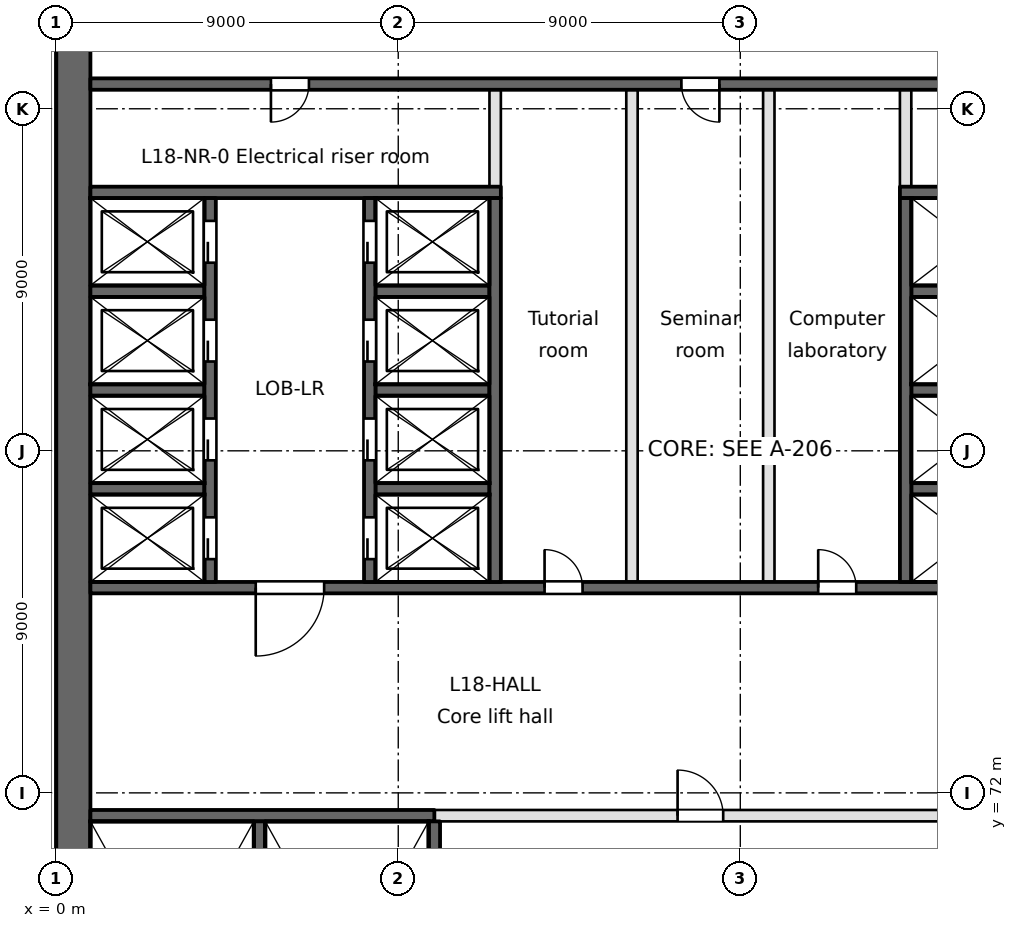
"""IFC4 building model, lengths in metres.
Left out: names, types, materials, properties, quantities, classifications, styles, units other than length and angle.
Written with IfcOpenShell. Run it as: python <this file> out.ifc"""

import sys

from ifc_helpers import new_model, si_unit, direction, frame, frame_2d, origin, place, context, subcontext, project, spatial, rectangle, extrude, element, fill, save


model = new_model("IFC4")
c1 = context("Model", 3, precision=1e-05, world=origin(), true_north=direction((0.0, 1.0)))
c2 = subcontext(c1, "Body", "Model", "MODEL_VIEW")
j1 = project(units=[si_unit("LENGTHUNIT", "METRE"), si_unit("PLANEANGLEUNIT", "RADIAN")], contexts=[c1])
p1 = place(None, origin())
s1 = spatial("IfcSite", under=j1, at=p1, CompositionType="ELEMENT")
p2 = place(p1, origin())
s2 = spatial("IfcBuilding", under=s1, at=p2, CompositionType="ELEMENT")
p3 = place(p2, frame((0.0, 0.0, 76.5)))
s3 = spatial("IfcBuildingStorey", under=s2, at=p3, CompositionType="ELEMENT", Elevation=76.5)
p4 = place(p3, frame((0.45, 94.5, 0.0), z_axis=(0.0, 0.0, 1.0), x_axis=(0.0, -1.0, 0.0)))
e1 = element("IfcWall", 1, at=p4, inside=s3, PredefinedType="SHEAR", context=c2, shape_type="SweptSolid", body=[
    extrude(rectangle(XDim=66.187, YDim=0.9, at=frame_2d((33.094, 0.0))), origin(), (0.0, 0.0, 1.0), 3.7),
])
p5 = place(p3, frame((0.9, 71.4, -0.4), z_axis=(0.0, 0.0, 1.0), x_axis=(1.0, 0.0, 0.0)))
e2 = element("IfcWall", 2, at=p5, inside=s3, PredefinedType="SOLIDWALL", context=c2, shape_type="SweptSolid", body=[
    extrude(rectangle(XDim=9.05, YDim=0.3, at=frame_2d((4.525, 0.0))), origin(), (0.0, 0.0, 1.0), 3.65),
])
p6 = place(p3, frame((9.95, 71.4, 0.0), z_axis=(0.0, 0.0, 1.0), x_axis=(1.0, 0.0, 0.0)))
e3 = element("IfcWall", 3, at=p6, inside=s3, PredefinedType="PARTITIONING", context=c2, shape_type="SweptSolid", body=[
    extrude(rectangle(XDim=17.65, YDim=0.3, at=frame_2d((8.825, 0.0))), origin(), (0.0, 0.0, 1.0), 3.25),
])
p7 = place(p6, frame((14.85, 0.0, 0.0)))
e4 = element("IfcOpeningElement", 4, at=p7, cuts=e3, PredefinedType="OPENING", context=c2, shape_type="SweptSolid", body=[
    extrude(rectangle(XDim=1.8, YDim=2.1, at=frame_2d((0.9, 1.05))), frame((0.0, 0.15, 0.0), z_axis=(0.0, -1.0, 0.0), x_axis=(1.0, 0.0, 0.0)), (0.0, 0.0, 1.0), 0.3),
])
p8 = place(p6, frame((6.4, 0.0, 0.0)))
e5 = element("IfcOpeningElement", 5, at=p8, cuts=e3, PredefinedType="OPENING", context=c2, shape_type="SweptSolid", body=[
    extrude(rectangle(XDim=1.2, YDim=2.1, at=frame_2d((0.6, 1.05))), frame((0.0, 0.15, 0.0), z_axis=(0.0, -1.0, 0.0), x_axis=(1.0, 0.0, 0.0)), (0.0, 0.0, 1.0), 0.3),
])
p9 = place(p3, frame((0.9, 77.4, -0.4), z_axis=(0.0, 0.0, 1.0), x_axis=(1.0, 0.0, 0.0)))
e6 = element("IfcWall", 6, at=p9, inside=s3, PredefinedType="SOLIDWALL", context=c2, shape_type="SweptSolid", body=[
    extrude(rectangle(XDim=28.95, YDim=0.3, at=frame_2d((14.475, 0.0))), origin(), (0.0, 0.0, 1.0), 3.65),
])
p10 = place(p9, frame((4.35, 0.0, 0.4)))
e7 = element("IfcOpeningElement", 7, at=p10, cuts=e6, PredefinedType="OPENING", context=c2, shape_type="SweptSolid", body=[
    extrude(rectangle(XDim=1.8, YDim=2.1, at=frame_2d((0.9, 1.05))), frame((0.0, 0.15, 0.0), z_axis=(0.0, -1.0, 0.0), x_axis=(1.0, 0.0, 0.0)), (0.0, 0.0, 1.0), 0.3),
])
p11 = place(p9, frame((25.95, 0.0, 0.4)))
e8 = element("IfcOpeningElement", 8, at=p11, cuts=e6, PredefinedType="OPENING", context=c2, shape_type="SweptSolid", body=[
    extrude(rectangle(XDim=1.8, YDim=2.1, at=frame_2d((0.9, 1.05))), frame((0.0, 0.15, 0.0), z_axis=(0.0, -1.0, 0.0), x_axis=(1.0, 0.0, 0.0)), (0.0, 0.0, 1.0), 0.3),
])
p12 = place(p9, frame((11.95, 0.0, 0.4)))
e9 = element("IfcOpeningElement", 9, at=p12, cuts=e6, PredefinedType="OPENING", context=c2, shape_type="SweptSolid", body=[
    extrude(rectangle(XDim=1.0, YDim=2.1, at=frame_2d((0.5, 1.05))), frame((0.0, 0.15, 0.0), z_axis=(0.0, -1.0, 0.0), x_axis=(1.0, 0.0, 0.0)), (0.0, 0.0, 1.0), 0.3),
])
p13 = place(p9, frame((19.15, 0.0, 0.4)))
e10 = element("IfcOpeningElement", 10, at=p13, cuts=e6, PredefinedType="OPENING", context=c2, shape_type="SweptSolid", body=[
    extrude(rectangle(XDim=1.0, YDim=2.1, at=frame_2d((0.5, 1.05))), frame((0.0, 0.15, 0.0), z_axis=(0.0, -1.0, 0.0), x_axis=(1.0, 0.0, 0.0)), (0.0, 0.0, 1.0), 0.3),
])
for number, where, z_axis, x_axis in (
    (11, (0.9, 80.0, -0.4), (0.0, 0.0, 1.0), (1.0, 0.0, 0.0)),
    (12, (8.4, 80.0, -0.4), (0.0, 0.0, 1.0), (1.0, 0.0, 0.0)),
    (13, (22.5, 80.0, -0.4), (0.0, 0.0, 1.0), (1.0, 0.0, 0.0)),
    (14, (0.9, 82.6, -0.4), (0.0, 0.0, 1.0), (1.0, 0.0, 0.0)),
    (15, (8.4, 82.6, -0.4), (0.0, 0.0, 1.0), (1.0, 0.0, 0.0)),
    (16, (22.5, 82.6, -0.4), (0.0, 0.0, 1.0), (1.0, 0.0, 0.0)),
    (17, (0.9, 85.2, -0.4), (0.0, 0.0, 1.0), (1.0, 0.0, 0.0)),
    (18, (8.4, 85.2, -0.4), (0.0, 0.0, 1.0), (1.0, 0.0, 0.0)),
    (19, (22.5, 85.2, -0.4), (0.0, 0.0, 1.0), (1.0, 0.0, 0.0)),
):
    element("IfcWall", number, at=place(p3, frame(where, z_axis=z_axis, x_axis=x_axis)), inside=s3, PredefinedType="SOLIDWALL", context=c2, shape_type="SweptSolid", body=[
        extrude(rectangle(XDim=3.0, YDim=0.3, at=frame_2d((1.5, 0.0))), origin(), (0.0, 0.0, 1.0), 3.65),
    ])
p14 = place(p3, frame((0.9, 87.8, -0.4), z_axis=(0.0, 0.0, 1.0), x_axis=(1.0, 0.0, 0.0)))
e20 = element("IfcWall", 20, at=p14, inside=s3, PredefinedType="SOLIDWALL", context=c2, shape_type="SweptSolid", body=[
    extrude(rectangle(XDim=10.8, YDim=0.3, at=frame_2d((5.4, 0.0))), origin(), (0.0, 0.0, 1.0), 3.65),
])
p15 = place(p3, frame((22.2, 87.8, -0.4), z_axis=(0.0, 0.0, 1.0), x_axis=(1.0, 0.0, 0.0)))
e21 = element("IfcWall", 21, at=p15, inside=s3, PredefinedType="SOLIDWALL", context=c2, shape_type="SweptSolid", body=[
    extrude(rectangle(XDim=7.8, YDim=0.3, at=frame_2d((3.9, 0.0))), origin(), (0.0, 0.0, 1.0), 3.65),
])
p16 = place(p3, frame((0.9, 90.65, -0.4), z_axis=(0.0, 0.0, 1.0), x_axis=(1.0, 0.0, 0.0)))
e22 = element("IfcWall", 22, at=p16, inside=s3, PredefinedType="SOLIDWALL", context=c2, shape_type="SweptSolid", body=[
    extrude(rectangle(XDim=34.6, YDim=0.3, at=frame_2d((17.3, 0.0))), origin(), (0.0, 0.0, 1.0), 3.65),
])
p17 = place(p16, frame((4.75, 0.0, 0.4)))
e23 = element("IfcOpeningElement", 23, at=p17, cuts=e22, PredefinedType="OPENING", context=c2, shape_type="SweptSolid", body=[
    extrude(rectangle(XDim=1.0, YDim=2.1, at=frame_2d((0.5, 1.05))), frame((0.0, 0.15, 0.0), z_axis=(0.0, -1.0, 0.0), x_axis=(1.0, 0.0, 0.0)), (0.0, 0.0, 1.0), 0.3),
])
p18 = place(p16, frame((24.7, 0.0, 0.4)))
e24 = element("IfcOpeningElement", 24, at=p18, cuts=e22, PredefinedType="OPENING", context=c2, shape_type="SweptSolid", body=[
    extrude(rectangle(XDim=1.0, YDim=2.1, at=frame_2d((0.5, 1.05))), frame((0.0, 0.15, 0.0), z_axis=(0.0, -1.0, 0.0), x_axis=(1.0, 0.0, 0.0)), (0.0, 0.0, 1.0), 0.3),
])
p19 = place(p16, frame((15.55, 0.0, 0.4)))
e25 = element("IfcOpeningElement", 25, at=p19, cuts=e22, PredefinedType="OPENING", context=c2, shape_type="SweptSolid", body=[
    extrude(rectangle(XDim=1.0, YDim=2.1, at=frame_2d((0.5, 1.05))), frame((0.0, 0.15, 0.0), z_axis=(0.0, -1.0, 0.0), x_axis=(1.0, 0.0, 0.0)), (0.0, 0.0, 1.0), 0.3),
])
p20 = place(p16, frame((31.4, 0.0, 0.4)))
e26 = element("IfcOpeningElement", 26, at=p20, cuts=e22, PredefinedType="OPENING", context=c2, shape_type="SweptSolid", body=[
    extrude(rectangle(XDim=1.0, YDim=2.1, at=frame_2d((0.5, 1.05))), frame((0.0, 0.15, 0.0), z_axis=(0.0, -1.0, 0.0), x_axis=(1.0, 0.0, 0.0)), (0.0, 0.0, 1.0), 0.3),
])
p21 = place(p3, frame((4.05, 77.55, -0.4), z_axis=(0.0, 0.0, 1.0), x_axis=(0.0, 1.0, 0.0)))
e27 = element("IfcWall", 27, at=p21, inside=s3, PredefinedType="SOLIDWALL", context=c2, shape_type="SweptSolid", body=[
    extrude(rectangle(XDim=10.1, YDim=0.3, at=frame_2d((5.05, 0.0))), origin(), (0.0, 0.0, 1.0), 3.65),
])
p22 = place(p21, frame((0.6, 0.0, 0.4)))
e28 = element("IfcOpeningElement", 28, at=p22, cuts=e27, PredefinedType="OPENING", context=c2, shape_type="SweptSolid", body=[
    extrude(rectangle(XDim=1.1, YDim=2.1, at=frame_2d((0.55, 1.05))), frame((0.0, 0.15, 0.0), z_axis=(0.0, -1.0, 0.0), x_axis=(1.0, 0.0, 0.0)), (0.0, 0.0, 1.0), 0.3),
])
p23 = place(p21, frame((3.2, 0.0, 0.4)))
e29 = element("IfcOpeningElement", 29, at=p23, cuts=e27, PredefinedType="OPENING", context=c2, shape_type="SweptSolid", body=[
    extrude(rectangle(XDim=1.1, YDim=2.1, at=frame_2d((0.55, 1.05))), frame((0.0, 0.15, 0.0), z_axis=(0.0, -1.0, 0.0), x_axis=(1.0, 0.0, 0.0)), (0.0, 0.0, 1.0), 0.3),
])
p24 = place(p21, frame((5.8, 0.0, 0.4)))
e30 = element("IfcOpeningElement", 30, at=p24, cuts=e27, PredefinedType="OPENING", context=c2, shape_type="SweptSolid", body=[
    extrude(rectangle(XDim=1.1, YDim=2.1, at=frame_2d((0.55, 1.05))), frame((0.0, 0.15, 0.0), z_axis=(0.0, -1.0, 0.0), x_axis=(1.0, 0.0, 0.0)), (0.0, 0.0, 1.0), 0.3),
])
p25 = place(p21, frame((8.4, 0.0, 0.4)))
e31 = element("IfcOpeningElement", 31, at=p25, cuts=e27, PredefinedType="OPENING", context=c2, shape_type="SweptSolid", body=[
    extrude(rectangle(XDim=1.1, YDim=2.1, at=frame_2d((0.55, 1.05))), frame((0.0, 0.15, 0.0), z_axis=(0.0, -1.0, 0.0), x_axis=(1.0, 0.0, 0.0)), (0.0, 0.0, 1.0), 0.3),
])
p26 = place(p3, frame((5.35, 63.5, -0.4), z_axis=(0.0, 0.0, 1.0), x_axis=(0.0, 1.0, 0.0)))
e32 = element("IfcWall", 32, at=p26, inside=s3, PredefinedType="SOLIDWALL", context=c2, shape_type="SweptSolid", body=[
    extrude(rectangle(XDim=7.75, YDim=0.3, at=frame_2d((3.875, 0.0))), origin(), (0.0, 0.0, 1.0), 3.65),
])
p27 = place(p3, frame((8.25, 77.55, -0.4), z_axis=(0.0, 0.0, 1.0), x_axis=(0.0, 1.0, 0.0)))
e33 = element("IfcWall", 33, at=p27, inside=s3, PredefinedType="SOLIDWALL", context=c2, shape_type="SweptSolid", body=[
    extrude(rectangle(XDim=10.1, YDim=0.3, at=frame_2d((5.05, 0.0))), origin(), (0.0, 0.0, 1.0), 3.65),
])
p28 = place(p27, frame((0.6, 0.0, 0.4)))
e34 = element("IfcOpeningElement", 34, at=p28, cuts=e33, PredefinedType="OPENING", context=c2, shape_type="SweptSolid", body=[
    extrude(rectangle(XDim=1.1, YDim=2.1, at=frame_2d((0.55, 1.05))), frame((0.0, 0.15, 0.0), z_axis=(0.0, -1.0, 0.0), x_axis=(1.0, 0.0, 0.0)), (0.0, 0.0, 1.0), 0.3),
])
p29 = place(p27, frame((3.2, 0.0, 0.4)))
e35 = element("IfcOpeningElement", 35, at=p29, cuts=e33, PredefinedType="OPENING", context=c2, shape_type="SweptSolid", body=[
    extrude(rectangle(XDim=1.1, YDim=2.1, at=frame_2d((0.55, 1.05))), frame((0.0, 0.15, 0.0), z_axis=(0.0, -1.0, 0.0), x_axis=(1.0, 0.0, 0.0)), (0.0, 0.0, 1.0), 0.3),
])
p30 = place(p27, frame((5.8, 0.0, 0.4)))
e36 = element("IfcOpeningElement", 36, at=p30, cuts=e33, PredefinedType="OPENING", context=c2, shape_type="SweptSolid", body=[
    extrude(rectangle(XDim=1.1, YDim=2.1, at=frame_2d((0.55, 1.05))), frame((0.0, 0.15, 0.0), z_axis=(0.0, -1.0, 0.0), x_axis=(1.0, 0.0, 0.0)), (0.0, 0.0, 1.0), 0.3),
])
p31 = place(p27, frame((8.4, 0.0, 0.4)))
e37 = element("IfcOpeningElement", 37, at=p31, cuts=e33, PredefinedType="OPENING", context=c2, shape_type="SweptSolid", body=[
    extrude(rectangle(XDim=1.1, YDim=2.1, at=frame_2d((0.55, 1.05))), frame((0.0, 0.15, 0.0), z_axis=(0.0, -1.0, 0.0), x_axis=(1.0, 0.0, 0.0)), (0.0, 0.0, 1.0), 0.3),
])
p32 = place(p3, frame((9.95, 63.5, -0.4), z_axis=(0.0, 0.0, 1.0), x_axis=(0.0, 1.0, 0.0)))
e38 = element("IfcWall", 38, at=p32, inside=s3, PredefinedType="SOLIDWALL", context=c2, shape_type="SweptSolid", body=[
    extrude(rectangle(XDim=7.75, YDim=0.3, at=frame_2d((3.875, 0.0))), origin(), (0.0, 0.0, 1.0), 3.65),
])
p33 = place(p3, frame((11.55, 77.55, -0.4), z_axis=(0.0, 0.0, 1.0), x_axis=(0.0, 1.0, 0.0)))
e39 = element("IfcWall", 39, at=p33, inside=s3, PredefinedType="SOLIDWALL", context=c2, shape_type="SweptSolid", body=[
    extrude(rectangle(XDim=10.1, YDim=0.3, at=frame_2d((5.05, 0.0))), origin(), (0.0, 0.0, 1.0), 3.65),
])
p34 = place(p3, frame((11.55, 87.95, 0.0), z_axis=(0.0, 0.0, 1.0), x_axis=(0.0, 1.0, 0.0)))
e40 = element("IfcWall", 40, at=p34, inside=s3, PredefinedType="PARTITIONING", context=c2, shape_type="SweptSolid", body=[
    extrude(rectangle(XDim=2.55, YDim=0.3, at=frame_2d((1.275, 0.0))), origin(), (0.0, 0.0, 1.0), 3.25),
])
for number, where, z_axis, x_axis in (
    (41, (15.15, 77.55, 0.0), (0.0, 0.0, 1.0), (0.0, 1.0, 0.0)),
    (42, (18.75, 77.55, 0.0), (0.0, 0.0, 1.0), (0.0, 1.0, 0.0)),
):
    element("IfcWall", number, at=place(p3, frame(where, z_axis=z_axis, x_axis=x_axis)), inside=s3, PredefinedType="PARTITIONING", context=c2, shape_type="SweptSolid", body=[
        extrude(rectangle(XDim=12.95, YDim=0.3, at=frame_2d((6.475, 0.0))), origin(), (0.0, 0.0, 1.0), 3.25),
    ])
p35 = place(p3, frame((22.35, 77.55, -0.4), z_axis=(0.0, 0.0, 1.0), x_axis=(0.0, 1.0, 0.0)))
e43 = element("IfcWall", 43, at=p35, inside=s3, PredefinedType="SOLIDWALL", context=c2, shape_type="SweptSolid", body=[
    extrude(rectangle(XDim=10.1, YDim=0.3, at=frame_2d((5.05, 0.0))), origin(), (0.0, 0.0, 1.0), 3.65),
])
p36 = place(p3, frame((22.35, 87.95, 0.0), z_axis=(0.0, 0.0, 1.0), x_axis=(0.0, 1.0, 0.0)))
e44 = element("IfcWall", 44, at=p36, inside=s3, PredefinedType="PARTITIONING", context=c2, shape_type="SweptSolid", body=[
    extrude(rectangle(XDim=2.55, YDim=0.3, at=frame_2d((1.275, 0.0))), origin(), (0.0, 0.0, 1.0), 3.25),
])
p37 = place(p22, origin())
e45 = element("IfcDoor", 45, at=p37, inside=s3, OperationType="SLIDING_TO_RIGHT", PredefinedType="DOOR", context=c2, shape_type="SweptSolid", body=[
    extrude(rectangle(XDim=1.1, YDim=2.1, at=frame_2d((0.55, 1.05))), frame((0.0, 0.025, 0.0), z_axis=(0.0, -1.0, 0.0), x_axis=(1.0, 0.0, 0.0)), (0.0, 0.0, 1.0), 0.05),
])
fill(e28, e45)
p38 = place(p23, origin())
e46 = element("IfcDoor", 46, at=p38, inside=s3, OperationType="SLIDING_TO_LEFT", PredefinedType="DOOR", context=c2, shape_type="SweptSolid", body=[
    extrude(rectangle(XDim=1.1, YDim=2.1, at=frame_2d((0.55, 1.05))), frame((0.0, 0.025, 0.0), z_axis=(0.0, -1.0, 0.0), x_axis=(1.0, 0.0, 0.0)), (0.0, 0.0, 1.0), 0.05),
])
fill(e29, e46)
p39 = place(p24, origin())
e47 = element("IfcDoor", 47, at=p39, inside=s3, OperationType="SLIDING_TO_RIGHT", PredefinedType="DOOR", context=c2, shape_type="SweptSolid", body=[
    extrude(rectangle(XDim=1.1, YDim=2.1, at=frame_2d((0.55, 1.05))), frame((0.0, 0.025, 0.0), z_axis=(0.0, -1.0, 0.0), x_axis=(1.0, 0.0, 0.0)), (0.0, 0.0, 1.0), 0.05),
])
fill(e30, e47)
p40 = place(p25, origin())
e48 = element("IfcDoor", 48, at=p40, inside=s3, OperationType="SLIDING_TO_LEFT", PredefinedType="DOOR", context=c2, shape_type="SweptSolid", body=[
    extrude(rectangle(XDim=1.1, YDim=2.1, at=frame_2d((0.55, 1.05))), frame((0.0, 0.025, 0.0), z_axis=(0.0, -1.0, 0.0), x_axis=(1.0, 0.0, 0.0)), (0.0, 0.0, 1.0), 0.05),
])
fill(e31, e48)
p41 = place(p28, origin())
e49 = element("IfcDoor", 49, at=p41, inside=s3, OperationType="SLIDING_TO_RIGHT", PredefinedType="DOOR", context=c2, shape_type="SweptSolid", body=[
    extrude(rectangle(XDim=1.1, YDim=2.1, at=frame_2d((0.55, 1.05))), frame((0.0, 0.025, 0.0), z_axis=(0.0, -1.0, 0.0), x_axis=(1.0, 0.0, 0.0)), (0.0, 0.0, 1.0), 0.05),
])
fill(e34, e49)
p42 = place(p29, origin())
e50 = element("IfcDoor", 50, at=p42, inside=s3, OperationType="SLIDING_TO_LEFT", PredefinedType="DOOR", context=c2, shape_type="SweptSolid", body=[
    extrude(rectangle(XDim=1.1, YDim=2.1, at=frame_2d((0.55, 1.05))), frame((0.0, 0.025, 0.0), z_axis=(0.0, -1.0, 0.0), x_axis=(1.0, 0.0, 0.0)), (0.0, 0.0, 1.0), 0.05),
])
fill(e35, e50)
p43 = place(p30, origin())
e51 = element("IfcDoor", 51, at=p43, inside=s3, OperationType="SLIDING_TO_RIGHT", PredefinedType="DOOR", context=c2, shape_type="SweptSolid", body=[
    extrude(rectangle(XDim=1.1, YDim=2.1, at=frame_2d((0.55, 1.05))), frame((0.0, 0.025, 0.0), z_axis=(0.0, -1.0, 0.0), x_axis=(1.0, 0.0, 0.0)), (0.0, 0.0, 1.0), 0.05),
])
fill(e36, e51)
p44 = place(p31, origin())
e52 = element("IfcDoor", 52, at=p44, inside=s3, OperationType="SLIDING_TO_LEFT", PredefinedType="DOOR", context=c2, shape_type="SweptSolid", body=[
    extrude(rectangle(XDim=1.1, YDim=2.1, at=frame_2d((0.55, 1.05))), frame((0.0, 0.025, 0.0), z_axis=(0.0, -1.0, 0.0), x_axis=(1.0, 0.0, 0.0)), (0.0, 0.0, 1.0), 0.05),
])
fill(e37, e52)
p45 = place(p10, frame((1.8, 0.0, 0.0), z_axis=(0.0, 0.0, 1.0), x_axis=(-1.0, 0.0, 0.0)))
e53 = element("IfcDoor", 53, at=p45, inside=s3, OperationType="SINGLE_SWING_RIGHT", PredefinedType="DOOR", context=c2, shape_type="SweptSolid", body=[
    extrude(rectangle(XDim=1.8, YDim=2.1, at=frame_2d((0.9, 1.05))), frame((0.0, 0.025, 0.0), z_axis=(0.0, -1.0, 0.0), x_axis=(1.0, 0.0, 0.0)), (0.0, 0.0, 1.0), 0.05),
])
fill(e7, e53)
p46 = place(p8, origin())
e54 = element("IfcDoor", 54, at=p46, inside=s3, OperationType="SINGLE_SWING_LEFT", PredefinedType="DOOR", context=c2, shape_type="SweptSolid", body=[
    extrude(rectangle(XDim=1.2, YDim=2.1, at=frame_2d((0.6, 1.05))), frame((0.0, 0.025, 0.0), z_axis=(0.0, -1.0, 0.0), x_axis=(1.0, 0.0, 0.0)), (0.0, 0.0, 1.0), 0.05),
])
fill(e5, e54)
p47 = place(p17, frame((1.0, 0.0, 0.0), z_axis=(0.0, 0.0, 1.0), x_axis=(-1.0, 0.0, 0.0)))
e55 = element("IfcDoor", 55, at=p47, inside=s3, OperationType="SINGLE_SWING_RIGHT", PredefinedType="DOOR", context=c2, shape_type="SweptSolid", body=[
    extrude(rectangle(XDim=1.0, YDim=2.1, at=frame_2d((0.5, 1.05))), frame((0.0, 0.025, 0.0), z_axis=(0.0, -1.0, 0.0), x_axis=(1.0, 0.0, 0.0)), (0.0, 0.0, 1.0), 0.05),
])
fill(e23, e55)
p48 = place(p12, origin())
e56 = element("IfcDoor", 56, at=p48, inside=s3, OperationType="SINGLE_SWING_LEFT", PredefinedType="DOOR", context=c2, shape_type="SweptSolid", body=[
    extrude(rectangle(XDim=1.0, YDim=2.1, at=frame_2d((0.5, 1.05))), frame((0.0, 0.025, 0.0), z_axis=(0.0, -1.0, 0.0), x_axis=(1.0, 0.0, 0.0)), (0.0, 0.0, 1.0), 0.05),
])
fill(e9, e56)
p49 = place(p19, frame((1.0, 0.0, 0.0), z_axis=(0.0, 0.0, 1.0), x_axis=(-1.0, 0.0, 0.0)))
e57 = element("IfcDoor", 57, at=p49, inside=s3, OperationType="SINGLE_SWING_LEFT", PredefinedType="DOOR", context=c2, shape_type="SweptSolid", body=[
    extrude(rectangle(XDim=1.0, YDim=2.1, at=frame_2d((0.5, 1.05))), frame((0.0, 0.025, 0.0), z_axis=(0.0, -1.0, 0.0), x_axis=(1.0, 0.0, 0.0)), (0.0, 0.0, 1.0), 0.05),
])
fill(e25, e57)
p50 = place(p13, origin())
e58 = element("IfcDoor", 58, at=p50, inside=s3, OperationType="SINGLE_SWING_LEFT", PredefinedType="DOOR", context=c2, shape_type="SweptSolid", body=[
    extrude(rectangle(XDim=1.0, YDim=2.1, at=frame_2d((0.5, 1.05))), frame((0.0, 0.025, 0.0), z_axis=(0.0, -1.0, 0.0), x_axis=(1.0, 0.0, 0.0)), (0.0, 0.0, 1.0), 0.05),
])
fill(e10, e58)
save(model, sys.argv[1])
